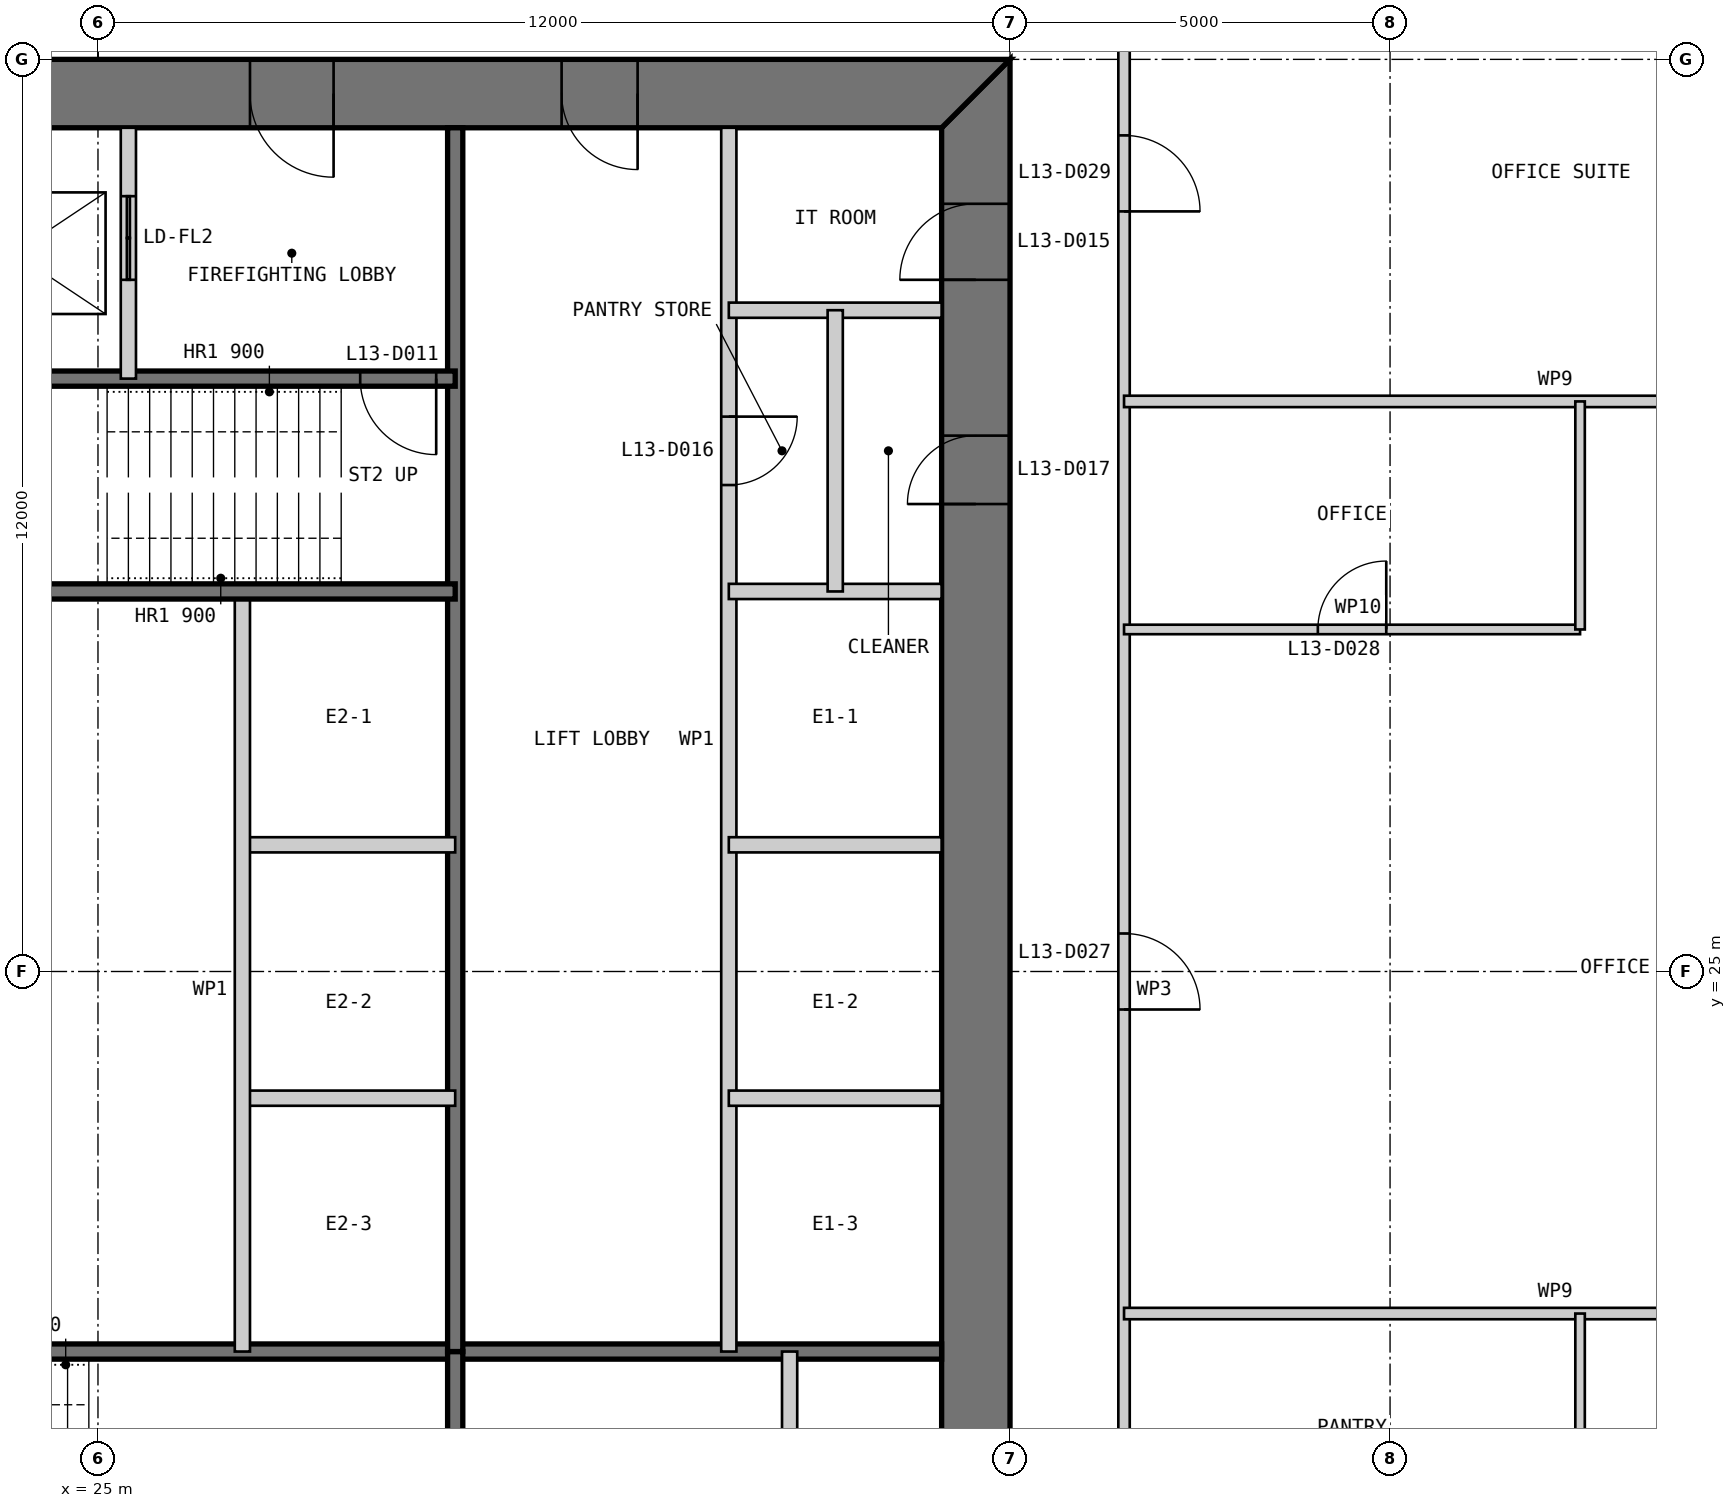
"""IFC4 building model, lengths in metres.
Left out: names, types, materials, properties, quantities, classifications, styles, units other than length and angle.
Written with IfcOpenShell. Run it as: python <this file> out.ifc"""

import sys

from ifc_helpers import new_model, si_unit, direction, frame, frame_2d, origin, place, context, subcontext, project, spatial, polyline, rectangle, outline, extrude, element, fill, save


model = new_model("IFC4")
c1 = context("Model", 3, precision=1e-05, world=origin(), true_north=direction((0.0, 1.0)))
c2 = subcontext(c1, "Body", "Model", "MODEL_VIEW")
j1 = project(units=[si_unit("LENGTHUNIT", "METRE"), si_unit("PLANEANGLEUNIT", "RADIAN")], contexts=[c1])
p1 = place(None, origin())
s1 = spatial("IfcSite", under=j1, at=p1, CompositionType="ELEMENT")
p2 = place(p1, origin())
s2 = spatial("IfcBuilding", under=s1, at=p2, CompositionType="ELEMENT")
p3 = place(p2, frame((0.0, 0.0, 59.0)))
s3 = spatial("IfcBuildingStorey", under=s2, at=p3, CompositionType="ELEMENT", Elevation=59.0)
p4 = place(p3, frame((36.55, 13.9, 0.0), z_axis=(0.0, 0.0, 1.0), x_axis=(0.0, 1.0, 0.0)))
e1 = element("IfcWall", 1, at=p4, inside=s3, PredefinedType="SHEAR", context=c2, shape_type="SweptSolid", body=[
    extrude(outline(polyline([(-0.9, -0.45), (23.1, -0.45), (22.2, 0.45), (0.0, 0.45), (-0.9, -0.45)])), origin(), (0.0, 0.0, 1.0), 4.0),
])
p5 = place(p4, frame((20.2, 0.0, 0.0)))
e2 = element("IfcOpeningElement", 2, at=p5, cuts=e1, PredefinedType="OPENING", context=c2, shape_type="SweptSolid", body=[
    extrude(rectangle(XDim=1.0, YDim=2.2, at=frame_2d((0.5, 1.1))), frame((0.0, 0.46, 0.0), z_axis=(0.0, -1.0, 0.0), x_axis=(1.0, 0.0, 0.0)), (0.0, 0.0, 1.0), 0.92),
])
p6 = place(p4, frame((17.25, 0.0, 0.0)))
e3 = element("IfcOpeningElement", 3, at=p6, cuts=e1, PredefinedType="OPENING", context=c2, shape_type="SweptSolid", body=[
    extrude(rectangle(XDim=0.9, YDim=2.2, at=frame_2d((0.45, 1.1))), frame((0.0, 0.46, 0.0), z_axis=(0.0, -1.0, 0.0), x_axis=(1.0, 0.0, 0.0)), (0.0, 0.0, 1.0), 0.92),
])
p7 = place(p3, frame((37.0, 36.55, 0.0), z_axis=(0.0, 0.0, 1.0), x_axis=(-1.0, 0.0, 0.0)))
e4 = element("IfcWall", 4, at=p7, inside=s3, PredefinedType="SHEAR", context=c2, shape_type="SweptSolid", body=[
    extrude(outline(polyline([(0.0, -0.45), (24.0, -0.45), (23.1, 0.45), (0.9, 0.45), (0.0, -0.45)])), origin(), (0.0, 0.0, 1.0), 4.0),
])
p8 = place(p7, frame((4.9, 0.0, 0.0)))
e5 = element("IfcOpeningElement", 5, at=p8, cuts=e4, PredefinedType="OPENING", context=c2, shape_type="SweptSolid", body=[
    extrude(rectangle(XDim=1.0, YDim=2.2, at=frame_2d((0.5, 1.1))), frame((0.0, 0.46, 0.0), z_axis=(0.0, -1.0, 0.0), x_axis=(1.0, 0.0, 0.0)), (0.0, 0.0, 1.0), 0.92),
])
p9 = place(p7, frame((8.9, 0.0, 0.0)))
e6 = element("IfcOpeningElement", 6, at=p9, cuts=e4, PredefinedType="OPENING", context=c2, shape_type="SweptSolid", body=[
    extrude(rectangle(XDim=1.1, YDim=2.2, at=frame_2d((0.55, 1.1))), frame((0.0, 0.46, 0.0), z_axis=(0.0, -1.0, 0.0), x_axis=(1.0, 0.0, 0.0)), (0.0, 0.0, 1.0), 0.92),
])
p10 = place(p7, frame((15.05, 0.0, 0.0)))
e7 = element("IfcOpeningElement", 7, at=p10, cuts=e4, PredefinedType="OPENING", context=c2, shape_type="SweptSolid", body=[
    extrude(rectangle(XDim=0.9, YDim=2.2, at=frame_2d((0.45, 1.1))), frame((0.0, 0.46, 0.0), z_axis=(0.0, -1.0, 0.0), x_axis=(1.0, 0.0, 0.0)), (0.0, 0.0, 1.0), 0.92),
])
p11 = place(p7, frame((17.9, 0.0, 0.0)))
e8 = element("IfcOpeningElement", 8, at=p11, cuts=e4, PredefinedType="OPENING", context=c2, shape_type="SweptSolid", body=[
    extrude(rectangle(XDim=1.0, YDim=2.2, at=frame_2d((0.5, 1.1))), frame((0.0, 0.46, 0.0), z_axis=(0.0, -1.0, 0.0), x_axis=(1.0, 0.0, 0.0)), (0.0, 0.0, 1.0), 0.92),
])
p12 = place(p7, frame((21.4, 0.0, 0.0)))
e9 = element("IfcOpeningElement", 9, at=p12, cuts=e4, PredefinedType="OPENING", context=c2, shape_type="SweptSolid", body=[
    extrude(rectangle(XDim=1.0, YDim=2.2, at=frame_2d((0.5, 1.1))), frame((0.0, 0.46, 0.0), z_axis=(0.0, -1.0, 0.0), x_axis=(1.0, 0.0, 0.0)), (0.0, 0.0, 1.0), 0.92),
])
p13 = place(p3, frame((20.3, 20.0, 0.0), z_axis=(0.0, 0.0, 1.0), x_axis=(1.0, 0.0, 0.0)))
e10 = element("IfcWall", 10, at=p13, inside=s3, PredefinedType="SOLIDWALL", context=c2, shape_type="SweptSolid", body=[
    extrude(rectangle(XDim=15.8, YDim=0.2, at=frame_2d((7.9, 0.0))), origin(), (0.0, 0.0, 1.0), 3.8),
])
p14 = place(p3, frame((29.7, 13.9, 0.0), z_axis=(0.0, 0.0, 1.0), x_axis=(0.0, 1.0, 0.0)))
e11 = element("IfcWall", 11, at=p14, inside=s3, PredefinedType="SOLIDWALL", context=c2, shape_type="SweptSolid", body=[
    extrude(rectangle(XDim=6.1, YDim=0.2, at=frame_2d((3.05, 0.0))), origin(), (0.0, 0.0, 1.0), 3.8),
])
p15 = place(p3, frame((34.1, 13.9, 0.0), z_axis=(0.0, 0.0, 1.0), x_axis=(0.0, 1.0, 0.0)))
e12 = element("IfcWall", 12, at=p15, inside=s3, PredefinedType="PARTITIONING", context=c2, shape_type="SweptSolid", body=[
    extrude(rectangle(XDim=6.1, YDim=0.2, at=frame_2d((3.05, 0.0))), origin(), (0.0, 0.0, 1.0), 3.8),
])
p16 = place(p3, frame((33.3, 36.1, 0.0), z_axis=(0.0, 0.0, 1.0), x_axis=(0.0, -1.0, 0.0)))
e13 = element("IfcWall", 13, at=p16, inside=s3, PredefinedType="PARTITIONING", context=c2, shape_type="SweptSolid", body=[
    extrude(rectangle(XDim=16.1, YDim=0.2, at=frame_2d((8.05, 0.0))), origin(), (0.0, 0.0, 1.0), 3.8),
])
p17 = place(p16, frame((3.8, 0.0, 0.0)))
e14 = element("IfcOpeningElement", 14, at=p17, cuts=e13, PredefinedType="OPENING", context=c2, shape_type="SweptSolid", body=[
    extrude(rectangle(XDim=0.9, YDim=2.2, at=frame_2d((0.45, 1.1))), frame((0.0, 0.11, 0.0), z_axis=(0.0, -1.0, 0.0), x_axis=(1.0, 0.0, 0.0)), (0.0, 0.0, 1.0), 0.22),
])
p18 = place(p3, frame((29.7, 36.1, 0.0), z_axis=(0.0, 0.0, 1.0), x_axis=(0.0, -1.0, 0.0)))
e15 = element("IfcWall", 15, at=p18, inside=s3, PredefinedType="SOLIDWALL", context=c2, shape_type="SweptSolid", body=[
    extrude(rectangle(XDim=16.1, YDim=0.2, at=frame_2d((8.05, 0.0))), origin(), (0.0, 0.0, 1.0), 3.8),
])
for number, where, z_axis, x_axis in (
    (16, (36.1, 30.0, 0.0), (0.0, 0.0, 1.0), (-1.0, 0.0, 0.0)),
    (17, (36.1, 26.667, 0.0), (0.0, 0.0, 1.0), (-1.0, 0.0, 0.0)),
    (18, (36.1, 23.333, 0.0), (0.0, 0.0, 1.0), (-1.0, 0.0, 0.0)),
    (19, (29.7, 26.667, 0.0), (0.0, 0.0, 1.0), (-1.0, 0.0, 0.0)),
    (20, (29.7, 23.333, 0.0), (0.0, 0.0, 1.0), (-1.0, 0.0, 0.0)),
):
    element("IfcWall", number, at=place(p3, frame(where, z_axis=z_axis, x_axis=x_axis)), inside=s3, PredefinedType="PARTITIONING", context=c2, shape_type="SweptSolid", body=[
        extrude(rectangle(XDim=2.8, YDim=0.2, at=frame_2d((1.4, 0.0))), origin(), (0.0, 0.0, 1.0), 3.8),
    ])
p19 = place(p3, frame((26.9, 30.0, 0.0), z_axis=(0.0, 0.0, 1.0), x_axis=(0.0, -1.0, 0.0)))
e21 = element("IfcWall", 21, at=p19, inside=s3, PredefinedType="PARTITIONING", context=c2, shape_type="SweptSolid", body=[
    extrude(rectangle(XDim=10.0, YDim=0.2, at=frame_2d((5.0, 0.0))), origin(), (0.0, 0.0, 1.0), 3.8),
])
p20 = place(p3, frame((29.7, 32.8, 0.0), z_axis=(0.0, 0.0, 1.0), x_axis=(-1.0, 0.0, 0.0)))
e22 = element("IfcWall", 22, at=p20, inside=s3, PredefinedType="SOLIDWALL", context=c2, shape_type="SweptSolid", body=[
    extrude(rectangle(XDim=9.4, YDim=0.2, at=frame_2d((4.7, 0.0))), origin(), (0.0, 0.0, 1.0), 3.8),
])
p21 = place(p20, frame((0.25, 0.0, 0.0)))
e23 = element("IfcOpeningElement", 23, at=p21, cuts=e22, PredefinedType="OPENING", context=c2, shape_type="SweptSolid", body=[
    extrude(rectangle(XDim=1.0, YDim=2.2, at=frame_2d((0.5, 1.1))), frame((0.0, 0.11, 0.0), z_axis=(0.0, -1.0, 0.0), x_axis=(1.0, 0.0, 0.0)), (0.0, 0.0, 1.0), 0.22),
])
p22 = place(p3, frame((29.7, 30.0, 0.0), z_axis=(0.0, 0.0, 1.0), x_axis=(-1.0, 0.0, 0.0)))
e24 = element("IfcWall", 24, at=p22, inside=s3, PredefinedType="SOLIDWALL", context=c2, shape_type="SweptSolid", body=[
    extrude(rectangle(XDim=15.8, YDim=0.2, at=frame_2d((7.9, 0.0))), origin(), (0.0, 0.0, 1.0), 3.8),
])
p23 = place(p3, frame((25.4, 36.1, 0.0), z_axis=(0.0, 0.0, 1.0), x_axis=(0.0, -1.0, 0.0)))
e25 = element("IfcWall", 25, at=p23, inside=s3, PredefinedType="PARTITIONING", context=c2, shape_type="SweptSolid", body=[
    extrude(rectangle(XDim=3.3, YDim=0.2, at=frame_2d((1.65, 0.0))), origin(), (0.0, 0.0, 1.0), 3.8),
])
p24 = place(p23, frame((0.9, 0.0, 0.0)))
e26 = element("IfcOpeningElement", 26, at=p24, cuts=e25, PredefinedType="OPENING", context=c2, shape_type="SweptSolid", body=[
    extrude(rectangle(XDim=1.1, YDim=2.2, at=frame_2d((0.55, 1.1))), frame((0.0, 0.11, 0.0), z_axis=(0.0, -1.0, 0.0), x_axis=(1.0, 0.0, 0.0)), (0.0, 0.0, 1.0), 0.22),
])
p25 = place(p3, frame((36.1, 33.7, 0.0), z_axis=(0.0, 0.0, 1.0), x_axis=(-1.0, 0.0, 0.0)))
e27 = element("IfcWall", 27, at=p25, inside=s3, PredefinedType="PARTITIONING", context=c2, shape_type="SweptSolid", body=[
    extrude(rectangle(XDim=2.8, YDim=0.2, at=frame_2d((1.4, 0.0))), origin(), (0.0, 0.0, 1.0), 3.8),
])
p26 = place(p3, frame((34.7, 33.7, 0.0), z_axis=(0.0, 0.0, 1.0), x_axis=(0.0, -1.0, 0.0)))
e28 = element("IfcWall", 28, at=p26, inside=s3, PredefinedType="PARTITIONING", context=c2, shape_type="SweptSolid", body=[
    extrude(rectangle(XDim=3.7, YDim=0.2, at=frame_2d((1.85, 0.0))), origin(), (0.0, 0.0, 1.0), 3.8),
])
p27 = place(p3, frame((38.5, 11.5, 0.0), z_axis=(0.0, 0.0, 1.0), x_axis=(0.0, 1.0, 0.0)))
e29 = element("IfcWall", 29, at=p27, inside=s3, PredefinedType="PARTITIONING", context=c2, shape_type="SweptSolid", body=[
    extrude(rectangle(XDim=27.0, YDim=0.15, at=frame_2d((13.5, 0.0))), origin(), (0.0, 0.0, 1.0), 3.85),
])
p28 = place(p27, frame((2.5, 0.0, 0.0)))
e30 = element("IfcOpeningElement", 30, at=p28, cuts=e29, PredefinedType="OPENING", context=c2, shape_type="SweptSolid", body=[
    extrude(rectangle(XDim=1.0, YDim=2.2, at=frame_2d((0.5, 1.1))), frame((0.0, 0.085, 0.0), z_axis=(0.0, -1.0, 0.0), x_axis=(1.0, 0.0, 0.0)), (0.0, 0.0, 1.0), 0.17),
])
p29 = place(p27, frame((13.0, 0.0, 0.0)))
e31 = element("IfcOpeningElement", 31, at=p29, cuts=e29, PredefinedType="OPENING", context=c2, shape_type="SweptSolid", body=[
    extrude(rectangle(XDim=1.0, YDim=2.2, at=frame_2d((0.5, 1.1))), frame((0.0, 0.085, 0.0), z_axis=(0.0, -1.0, 0.0), x_axis=(1.0, 0.0, 0.0)), (0.0, 0.0, 1.0), 0.17),
])
p30 = place(p27, frame((23.5, 0.0, 0.0)))
e32 = element("IfcOpeningElement", 32, at=p30, cuts=e29, PredefinedType="OPENING", context=c2, shape_type="SweptSolid", body=[
    extrude(rectangle(XDim=1.0, YDim=2.2, at=frame_2d((0.5, 1.1))), frame((0.0, 0.085, 0.0), z_axis=(0.0, -1.0, 0.0), x_axis=(1.0, 0.0, 0.0)), (0.0, 0.0, 1.0), 0.17),
])
p31 = place(p3, frame((49.85, 20.5, 0.0), z_axis=(0.0, 0.0, 1.0), x_axis=(-1.0, 0.0, 0.0)))
e33 = element("IfcWall", 33, at=p31, inside=s3, PredefinedType="PARTITIONING", context=c2, shape_type="SweptSolid", body=[
    extrude(rectangle(XDim=11.35, YDim=0.15, at=frame_2d((5.675, 0.0))), origin(), (0.0, 0.0, 1.0), 3.85),
])
p32 = place(p3, frame((44.5, 29.5, 0.0), z_axis=(0.0, 0.0, 1.0), x_axis=(-1.0, 0.0, 0.0)))
e34 = element("IfcWall", 34, at=p32, inside=s3, PredefinedType="PARTITIONING", context=c2, shape_type="SweptSolid", body=[
    extrude(rectangle(XDim=6.0, YDim=0.125, at=frame_2d((3.0, 0.0))), origin(), (0.0, 0.0, 1.0), 3.85),
])
p33 = place(p32, frame((2.55, 0.0, 0.0)))
e35 = element("IfcOpeningElement", 35, at=p33, cuts=e34, PredefinedType="OPENING", context=c2, shape_type="SweptSolid", body=[
    extrude(rectangle(XDim=0.9, YDim=2.2, at=frame_2d((0.45, 1.1))), frame((0.0, 0.073, 0.0), z_axis=(0.0, -1.0, 0.0), x_axis=(1.0, 0.0, 0.0)), (0.0, 0.0, 1.0), 0.145),
])
p34 = place(p3, frame((49.85, 32.5, 0.0), z_axis=(0.0, 0.0, 1.0), x_axis=(-1.0, 0.0, 0.0)))
e36 = element("IfcWall", 36, at=p34, inside=s3, PredefinedType="PARTITIONING", context=c2, shape_type="SweptSolid", body=[
    extrude(rectangle(XDim=11.35, YDim=0.15, at=frame_2d((5.675, 0.0))), origin(), (0.0, 0.0, 1.0), 3.85),
])
p35 = place(p3, frame((44.5, 14.5, 0.0), z_axis=(0.0, 0.0, 1.0), x_axis=(0.0, 1.0, 0.0)))
e37 = element("IfcWall", 37, at=p35, inside=s3, PredefinedType="PARTITIONING", context=c2, shape_type="SweptSolid", body=[
    extrude(rectangle(XDim=6.0, YDim=0.125, at=frame_2d((3.0, 0.0))), origin(), (0.0, 0.0, 1.0), 3.85),
])
p36 = place(p3, frame((44.5, 29.5, 0.0), z_axis=(0.0, 0.0, 1.0), x_axis=(0.0, 1.0, 0.0)))
e38 = element("IfcWall", 38, at=p36, inside=s3, PredefinedType="PARTITIONING", context=c2, shape_type="SweptSolid", body=[
    extrude(rectangle(XDim=3.0, YDim=0.125, at=frame_2d((1.5, 0.0))), origin(), (0.0, 0.0, 1.0), 3.85),
])
p37 = place(p8, origin())
e39 = element("IfcDoor", 39, at=p37, inside=s3, OperationType="SINGLE_SWING_LEFT", PredefinedType="DOOR", context=c2, shape_type="SweptSolid", body=[
    extrude(rectangle(XDim=1.0, YDim=2.2, at=frame_2d((0.5, 1.1))), frame((0.0, 0.025, 0.0), z_axis=(0.0, -1.0, 0.0), x_axis=(1.0, 0.0, 0.0)), (0.0, 0.0, 1.0), 0.05),
    extrude(outline(polyline([(0.0, 0.0), (0.04, 0.0), (0.04, 2.16), (0.96, 2.16), (0.96, 0.0), (1.0, 0.0), (1.0, 2.2), (0.0, 2.2), (0.0, 0.0)])), frame((0.0, 0.3, 0.0), z_axis=(0.0, -1.0, 0.0), x_axis=(1.0, 0.0, 0.0)), (0.0, 0.0, 1.0), 0.6),
])
fill(e5, e39)
p38 = place(p9, origin())
e40 = element("IfcDoor", 40, at=p38, inside=s3, OperationType="SINGLE_SWING_LEFT", PredefinedType="DOOR", context=c2, shape_type="SweptSolid", body=[
    extrude(rectangle(XDim=1.1, YDim=2.2, at=frame_2d((0.55, 1.1))), frame((0.0, 0.025, 0.0), z_axis=(0.0, -1.0, 0.0), x_axis=(1.0, 0.0, 0.0)), (0.0, 0.0, 1.0), 0.05),
    extrude(outline(polyline([(0.0, 0.0), (0.04, 0.0), (0.04, 2.16), (1.06, 2.16), (1.06, 0.0), (1.1, 0.0), (1.1, 2.2), (0.0, 2.2), (0.0, 0.0)])), frame((0.0, 0.3, 0.0), z_axis=(0.0, -1.0, 0.0), x_axis=(1.0, 0.0, 0.0)), (0.0, 0.0, 1.0), 0.6),
])
fill(e6, e40)
p39 = place(p21, origin())
e41 = element("IfcDoor", 41, at=p39, inside=s3, OperationType="SINGLE_SWING_LEFT", PredefinedType="DOOR", context=c2, shape_type="SweptSolid", body=[
    extrude(rectangle(XDim=1.0, YDim=2.2, at=frame_2d((0.5, 1.1))), frame((0.0, 0.025, 0.0), z_axis=(0.0, -1.0, 0.0), x_axis=(1.0, 0.0, 0.0)), (0.0, 0.0, 1.0), 0.05),
])
fill(e23, e41)
p40 = place(p5, origin())
e42 = element("IfcDoor", 42, at=p40, inside=s3, OperationType="SINGLE_SWING_LEFT", PredefinedType="DOOR", context=c2, shape_type="SweptSolid", body=[
    extrude(rectangle(XDim=1.0, YDim=2.2, at=frame_2d((0.5, 1.1))), frame((0.0, 0.025, 0.0), z_axis=(0.0, -1.0, 0.0), x_axis=(1.0, 0.0, 0.0)), (0.0, 0.0, 1.0), 0.05),
    extrude(outline(polyline([(0.0, 0.0), (0.04, 0.0), (0.04, 2.16), (0.96, 2.16), (0.96, 0.0), (1.0, 0.0), (1.0, 2.2), (0.0, 2.2), (0.0, 0.0)])), frame((0.0, 0.3, 0.0), z_axis=(0.0, -1.0, 0.0), x_axis=(1.0, 0.0, 0.0)), (0.0, 0.0, 1.0), 0.6),
])
fill(e2, e42)
p41 = place(p17, origin())
e43 = element("IfcDoor", 43, at=p41, inside=s3, OperationType="SINGLE_SWING_LEFT", PredefinedType="DOOR", context=c2, shape_type="SweptSolid", body=[
    extrude(rectangle(XDim=0.9, YDim=2.2, at=frame_2d((0.45, 1.1))), frame((0.0, 0.025, 0.0), z_axis=(0.0, -1.0, 0.0), x_axis=(1.0, 0.0, 0.0)), (0.0, 0.0, 1.0), 0.05),
])
fill(e14, e43)
p42 = place(p6, origin())
e44 = element("IfcDoor", 44, at=p42, inside=s3, OperationType="SINGLE_SWING_LEFT", PredefinedType="DOOR", context=c2, shape_type="SweptSolid", body=[
    extrude(rectangle(XDim=0.9, YDim=2.2, at=frame_2d((0.45, 1.1))), frame((0.0, 0.025, 0.0), z_axis=(0.0, -1.0, 0.0), x_axis=(1.0, 0.0, 0.0)), (0.0, 0.0, 1.0), 0.05),
    extrude(outline(polyline([(0.0, 0.0), (0.04, 0.0), (0.04, 2.16), (0.86, 2.16), (0.86, 0.0), (0.9, 0.0), (0.9, 2.2), (0.0, 2.2), (0.0, 0.0)])), frame((0.0, 0.3, 0.0), z_axis=(0.0, -1.0, 0.0), x_axis=(1.0, 0.0, 0.0)), (0.0, 0.0, 1.0), 0.6),
])
fill(e3, e44)
p43 = place(p29, frame((1.0, 0.0, 0.0), z_axis=(0.0, 0.0, 1.0), x_axis=(-1.0, 0.0, 0.0)))
e45 = element("IfcDoor", 45, at=p43, inside=s3, OperationType="SINGLE_SWING_RIGHT", PredefinedType="DOOR", context=c2, shape_type="SweptSolid", body=[
    extrude(rectangle(XDim=1.0, YDim=2.2, at=frame_2d((0.5, 1.1))), frame((0.0, 0.025, 0.0), z_axis=(0.0, -1.0, 0.0), x_axis=(1.0, 0.0, 0.0)), (0.0, 0.0, 1.0), 0.05),
])
fill(e31, e45)
p44 = place(p33, frame((0.9, 0.0, 0.0), z_axis=(0.0, 0.0, 1.0), x_axis=(-1.0, 0.0, 0.0)))
e46 = element("IfcDoor", 46, at=p44, inside=s3, OperationType="SINGLE_SWING_RIGHT", PredefinedType="DOOR", context=c2, shape_type="SweptSolid", body=[
    extrude(rectangle(XDim=0.9, YDim=2.2, at=frame_2d((0.45, 1.1))), frame((0.0, 0.025, 0.0), z_axis=(0.0, -1.0, 0.0), x_axis=(1.0, 0.0, 0.0)), (0.0, 0.0, 1.0), 0.05),
])
fill(e35, e46)
p45 = place(p30, frame((1.0, 0.0, 0.0), z_axis=(0.0, 0.0, 1.0), x_axis=(-1.0, 0.0, 0.0)))
e47 = element("IfcDoor", 47, at=p45, inside=s3, OperationType="SINGLE_SWING_RIGHT", PredefinedType="DOOR", context=c2, shape_type="SweptSolid", body=[
    extrude(rectangle(XDim=1.0, YDim=2.2, at=frame_2d((0.5, 1.1))), frame((0.0, 0.025, 0.0), z_axis=(0.0, -1.0, 0.0), x_axis=(1.0, 0.0, 0.0)), (0.0, 0.0, 1.0), 0.05),
])
fill(e32, e47)
p46 = place(p24, origin())
e48 = element("IfcDoor", 48, at=p46, inside=s3, OperationType="DOUBLE_DOOR_SLIDING", PredefinedType="DOOR", context=c2, shape_type="SweptSolid", body=[
    extrude(rectangle(XDim=1.1, YDim=2.2, at=frame_2d((0.55, 1.1))), frame((0.0, 0.025, 0.0), z_axis=(0.0, -1.0, 0.0), x_axis=(1.0, 0.0, 0.0)), (0.0, 0.0, 1.0), 0.05),
])
fill(e26, e48)
save(model, sys.argv[1])
